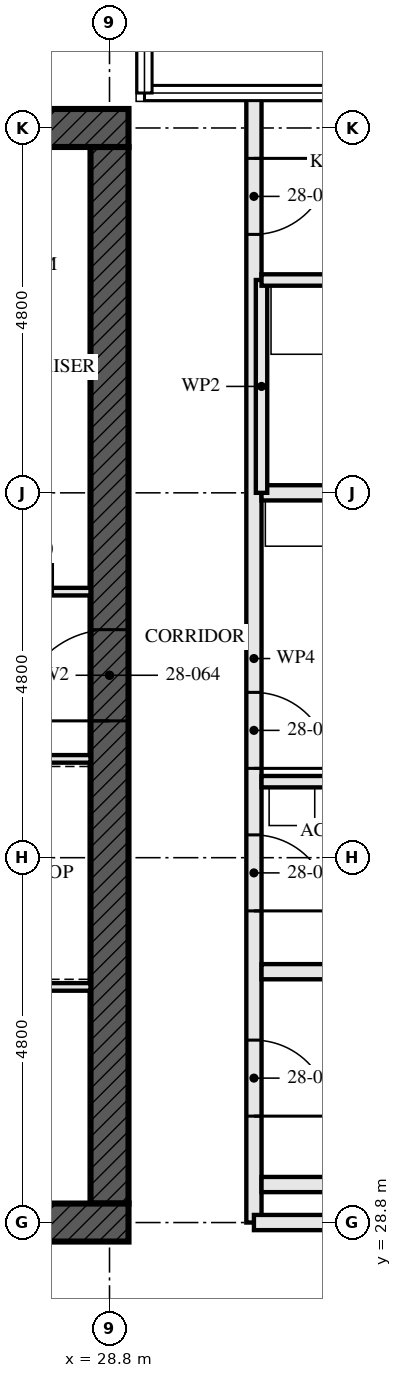
"""IFC4 building model, lengths in metres.
Left out: names, types, materials, properties, quantities, classifications, styles, units other than length and angle.
Written with IfcOpenShell. Run it as: python <this file> out.ifc"""

import sys

from ifc_helpers import new_model, si_unit, direction, frame, frame_2d, origin, place, context, subcontext, project, spatial, rectangle, extrude, element, fill, save


model = new_model("IFC4")
c1 = context("Model", 3, precision=1e-05, world=origin(), true_north=direction((0.0, 1.0)))
c2 = subcontext(c1, "Body", "Model", "MODEL_VIEW")
j1 = project(units=[si_unit("LENGTHUNIT", "METRE"), si_unit("PLANEANGLEUNIT", "RADIAN")], contexts=[c1])
p1 = place(None, origin())
s1 = spatial("IfcSite", under=j1, at=p1, CompositionType="ELEMENT")
p2 = place(p1, origin())
s2 = spatial("IfcBuilding", under=s1, at=p2, CompositionType="ELEMENT")
p3 = place(p2, frame((0.0, 0.0, 105.0)))
s3 = spatial("IfcBuildingStorey", under=s2, at=p3, CompositionType="ELEMENT", Elevation=105.0)
p4 = place(p3, frame((14.15, 28.8, -0.17), z_axis=(0.0, 0.0, 1.0), x_axis=(1.0, 0.0, 0.0)))
e1 = element("IfcWall", 1, at=p4, inside=s3, PredefinedType="SHEAR", context=c2, shape_type="SweptSolid", body=[
    extrude(rectangle(XDim=14.9, YDim=0.5, at=frame_2d((7.45, 0.0))), origin(), (0.0, 0.0, 1.0), 3.5),
])
p5 = place(p4, frame((6.85, 0.0, 0.17)))
e2 = element("IfcOpeningElement", 2, at=p5, cuts=e1, PredefinedType="OPENING", context=c2, shape_type="SweptSolid", body=[
    extrude(rectangle(XDim=1.2, YDim=2.1, at=frame_2d((0.6, 1.05))), frame((0.0, 0.26, 0.0), z_axis=(0.0, -1.0, 0.0), x_axis=(1.0, 0.0, 0.0)), (0.0, 0.0, 1.0), 0.521),
])
p6 = place(p3, frame((29.05, 43.2, -0.17), z_axis=(0.0, 0.0, 1.0), x_axis=(-1.0, 0.0, 0.0)))
e3 = element("IfcWall", 3, at=p6, inside=s3, PredefinedType="SHEAR", context=c2, shape_type="SweptSolid", body=[
    extrude(rectangle(XDim=14.9, YDim=0.5, at=frame_2d((7.45, 0.0))), origin(), (0.0, 0.0, 1.0), 3.5),
])
p7 = place(p6, frame((6.85, 0.0, 0.17)))
e4 = element("IfcOpeningElement", 4, at=p7, cuts=e3, PredefinedType="OPENING", context=c2, shape_type="SweptSolid", body=[
    extrude(rectangle(XDim=1.2, YDim=2.1, at=frame_2d((0.6, 1.05))), frame((0.0, 0.26, 0.0), z_axis=(0.0, -1.0, 0.0), x_axis=(1.0, 0.0, 0.0)), (0.0, 0.0, 1.0), 0.521),
])
p8 = place(p3, frame((28.8, 29.05, -0.17), z_axis=(0.0, 0.0, 1.0), x_axis=(0.0, 1.0, 0.0)))
e5 = element("IfcWall", 5, at=p8, inside=s3, PredefinedType="SHEAR", context=c2, shape_type="SweptSolid", body=[
    extrude(rectangle(XDim=13.9, YDim=0.5, at=frame_2d((6.95, 0.0))), origin(), (0.0, 0.0, 1.0), 3.5),
])
p9 = place(p8, frame((6.35, 0.0, 0.17)))
e6 = element("IfcOpeningElement", 6, at=p9, cuts=e5, PredefinedType="OPENING", context=c2, shape_type="SweptSolid", body=[
    extrude(rectangle(XDim=1.2, YDim=2.1, at=frame_2d((0.6, 1.05))), frame((0.0, 0.26, 0.0), z_axis=(0.0, -1.0, 0.0), x_axis=(1.0, 0.0, 0.0)), (0.0, 0.0, 1.0), 0.521),
])
for number, where, z_axis, x_axis in (
    (7, (35.5, 29.3, 0.0), (0.0, 0.0, 1.0), (-1.0, 0.0, 0.0)),
    (8, (35.5, 32.1, 0.0), (0.0, 0.0, 1.0), (-1.0, 0.0, 0.0)),
):
    element("IfcWall", number, at=place(p3, frame(where, z_axis=z_axis, x_axis=x_axis)), inside=s3, PredefinedType="SOLIDWALL", context=c2, shape_type="SweptSolid", body=[
        extrude(rectangle(XDim=4.7, YDim=0.2, at=frame_2d((2.35, 0.0))), origin(), (0.0, 0.0, 1.0), 2.99),
    ])
p10 = place(p3, frame((33.8, 34.6, 0.0), z_axis=(0.0, 0.0, 1.0), x_axis=(-1.0, 0.0, 0.0)))
e9 = element("IfcWall", 9, at=p10, inside=s3, PredefinedType="PARTITIONING", context=c2, shape_type="SweptSolid", body=[
    extrude(rectangle(XDim=3.0, YDim=0.15, at=frame_2d((1.5, 0.0))), origin(), (0.0, 0.0, 1.0), 3.33),
])
p11 = place(p3, frame((38.055, 38.4, 0.0), z_axis=(0.0, 0.0, 1.0), x_axis=(-1.0, 0.0, 0.0)))
e10 = element("IfcWall", 10, at=p11, inside=s3, PredefinedType="PARTITIONING", context=c2, shape_type="SweptSolid", body=[
    extrude(rectangle(XDim=7.255, YDim=0.2, at=frame_2d((3.627, 0.0))), origin(), (0.0, 0.0, 1.0), 2.55),
])
p12 = place(p3, frame((33.8, 41.2, 0.0), z_axis=(0.0, 0.0, 1.0), x_axis=(-1.0, 0.0, 0.0)))
e11 = element("IfcWall", 11, at=p12, inside=s3, PredefinedType="PARTITIONING", context=c2, shape_type="SweptSolid", body=[
    extrude(rectangle(XDim=3.0, YDim=0.15, at=frame_2d((1.5, 0.0))), origin(), (0.0, 0.0, 1.0), 3.33),
])
p13 = place(p3, frame((30.8, 38.4, 0.0), z_axis=(0.0, 0.0, 1.0), x_axis=(0.0, 1.0, 0.0)))
e12 = element("IfcWall", 12, at=p13, inside=s3, PredefinedType="PARTITIONING", context=c2, shape_type="SweptSolid", body=[
    extrude(rectangle(XDim=2.8, YDim=0.15, at=frame_2d((1.4, 0.0))), origin(), (0.0, 0.0, 1.0), 3.33),
])
p14 = place(p3, frame((30.7, 28.8, 0.0), z_axis=(0.0, 0.0, 1.0), x_axis=(0.0, 1.0, 0.0)))
e13 = element("IfcWall", 13, at=p14, inside=s3, PredefinedType="PARTITIONING", context=c2, shape_type="SweptSolid", body=[
    extrude(rectangle(XDim=14.84, YDim=0.2, at=frame_2d((7.42, 0.0))), origin(), (0.0, 0.0, 1.0), 2.32),
])
p15 = place(p14, frame((1.4, 0.0, 0.0)))
e14 = element("IfcOpeningElement", 14, at=p15, cuts=e13, PredefinedType="OPENING", context=c2, shape_type="SweptSolid", body=[
    extrude(rectangle(XDim=1.0, YDim=2.1, at=frame_2d((0.5, 1.05))), frame((0.0, 0.111, 0.0), z_axis=(0.0, -1.0, 0.0), x_axis=(1.0, 0.0, 0.0)), (0.0, 0.0, 1.0), 0.221),
])
p16 = place(p14, frame((4.1, 0.0, 0.0)))
e15 = element("IfcOpeningElement", 15, at=p16, cuts=e13, PredefinedType="OPENING", context=c2, shape_type="SweptSolid", body=[
    extrude(rectangle(XDim=1.0, YDim=2.1, at=frame_2d((0.5, 1.05))), frame((0.0, 0.111, 0.0), z_axis=(0.0, -1.0, 0.0), x_axis=(1.0, 0.0, 0.0)), (0.0, 0.0, 1.0), 0.221),
])
p17 = place(p14, frame((5.975, 0.0, 0.0)))
e16 = element("IfcOpeningElement", 16, at=p17, cuts=e13, PredefinedType="OPENING", context=c2, shape_type="SweptSolid", body=[
    extrude(rectangle(XDim=1.0, YDim=2.1, at=frame_2d((0.5, 1.05))), frame((0.0, 0.111, 0.0), z_axis=(0.0, -1.0, 0.0), x_axis=(1.0, 0.0, 0.0)), (0.0, 0.0, 1.0), 0.221),
])
p18 = place(p14, frame((13.0, 0.0, 0.0)))
e17 = element("IfcOpeningElement", 17, at=p18, cuts=e13, PredefinedType="OPENING", context=c2, shape_type="SweptSolid", body=[
    extrude(rectangle(XDim=1.0, YDim=2.1, at=frame_2d((0.5, 1.05))), frame((0.0, 0.111, 0.0), z_axis=(0.0, -1.0, 0.0), x_axis=(1.0, 0.0, 0.0)), (0.0, 0.0, 1.0), 0.221),
])
p19 = place(p3, frame((23.05, 34.9, 0.0), z_axis=(0.0, 0.0, 1.0), x_axis=(1.0, 0.0, 0.0)))
e18 = element("IfcWall", 18, at=p19, inside=s3, PredefinedType="SOLIDWALL", context=c2, shape_type="SweptSolid", body=[
    extrude(rectangle(XDim=5.5, YDim=0.1, at=frame_2d((2.75, 0.0))), origin(), (0.0, 0.0, 1.0), 3.33),
])
p20 = place(p3, frame((22.65, 37.1, 0.0), z_axis=(0.0, 0.0, 1.0), x_axis=(1.0, 0.0, 0.0)))
e19 = element("IfcWall", 19, at=p20, inside=s3, PredefinedType="SOLIDWALL", context=c2, shape_type="SweptSolid", body=[
    extrude(rectangle(XDim=5.9, YDim=0.1, at=frame_2d((2.95, 0.0))), origin(), (0.0, 0.0, 1.0), 3.33),
])
p21 = place(p20, frame((3.15, 0.0, 0.0)))
e20 = element("IfcOpeningElement", 20, at=p21, cuts=e19, PredefinedType="OPENING", context=c2, shape_type="SweptSolid", body=[
    extrude(rectangle(XDim=0.9, YDim=2.1, at=frame_2d((0.45, 1.05))), frame((0.0, 0.061, 0.0), z_axis=(0.0, -1.0, 0.0), x_axis=(1.0, 0.0, 0.0)), (0.0, 0.0, 1.0), 0.121),
])
p22 = place(p20, frame((4.7, 0.0, 0.0)))
e21 = element("IfcOpeningElement", 21, at=p22, cuts=e19, PredefinedType="OPENING", context=c2, shape_type="SweptSolid", body=[
    extrude(rectangle(XDim=0.7, YDim=2.1, at=frame_2d((0.35, 1.05))), frame((0.0, 0.061, 0.0), z_axis=(0.0, -1.0, 0.0), x_axis=(1.0, 0.0, 0.0)), (0.0, 0.0, 1.0), 0.121),
])
p23 = place(p3, frame((23.15, 31.9, 0.0), z_axis=(0.0, 0.0, 1.0), x_axis=(1.0, 0.0, 0.0)))
e22 = element("IfcWall", 22, at=p23, inside=s3, PredefinedType="SOLIDWALL", context=c2, shape_type="SweptSolid", body=[
    extrude(rectangle(XDim=5.4, YDim=0.1, at=frame_2d((2.7, 0.0))), origin(), (0.0, 0.0, 1.0), 3.33),
])
p24 = place(p3, frame((33.255, 28.8, 0.0), z_axis=(0.0, 0.0, 1.0), x_axis=(-1.0, 0.0, 0.0)))
e23 = element("IfcWall", 23, at=p24, inside=s3, PredefinedType="PARTITIONING", context=c2, shape_type="SweptSolid", body=[
    extrude(rectangle(XDim=2.555, YDim=0.2, at=frame_2d((1.277, 0.0))), origin(), (0.0, 0.0, 1.0), 2.32),
])
p25 = place(p15, frame((1.0, 0.0, 0.0), z_axis=(0.0, 0.0, 1.0), x_axis=(-1.0, 0.0, 0.0)))
e24 = element("IfcDoor", 24, at=p25, inside=s3, OperationType="SINGLE_SWING_LEFT", PredefinedType="DOOR", context=c2, shape_type="SweptSolid", body=[
    extrude(rectangle(XDim=1.0, YDim=2.1, at=frame_2d((0.5, 1.05))), frame((0.0, 0.032, 0.0), z_axis=(0.0, -1.0, 0.0), x_axis=(1.0, 0.0, 0.0)), (0.0, 0.0, 1.0), 0.064),
])
fill(e14, e24)
p26 = place(p16, frame((1.0, 0.0, 0.0), z_axis=(0.0, 0.0, 1.0), x_axis=(-1.0, 0.0, 0.0)))
e25 = element("IfcDoor", 25, at=p26, inside=s3, OperationType="SINGLE_SWING_LEFT", PredefinedType="DOOR", context=c2, shape_type="SweptSolid", body=[
    extrude(rectangle(XDim=1.0, YDim=2.1, at=frame_2d((0.5, 1.05))), frame((0.0, 0.027, 0.0), z_axis=(0.0, -1.0, 0.0), x_axis=(1.0, 0.0, 0.0)), (0.0, 0.0, 1.0), 0.054),
])
fill(e15, e25)
p27 = place(p17, frame((1.0, 0.0, 0.0), z_axis=(0.0, 0.0, 1.0), x_axis=(-1.0, 0.0, 0.0)))
e26 = element("IfcDoor", 26, at=p27, inside=s3, OperationType="SINGLE_SWING_LEFT", PredefinedType="DOOR", context=c2, shape_type="SweptSolid", body=[
    extrude(rectangle(XDim=1.0, YDim=2.1, at=frame_2d((0.5, 1.05))), frame((0.0, 0.027, 0.0), z_axis=(0.0, -1.0, 0.0), x_axis=(1.0, 0.0, 0.0)), (0.0, 0.0, 1.0), 0.054),
])
fill(e16, e26)
p28 = place(p18, frame((1.0, 0.0, 0.0), z_axis=(0.0, 0.0, 1.0), x_axis=(-1.0, 0.0, 0.0)))
e27 = element("IfcDoor", 27, at=p28, inside=s3, OperationType="SINGLE_SWING_RIGHT", PredefinedType="DOOR", context=c2, shape_type="SweptSolid", body=[
    extrude(rectangle(XDim=1.0, YDim=2.1, at=frame_2d((0.5, 1.05))), frame((0.0, 0.027, 0.0), z_axis=(0.0, -1.0, 0.0), x_axis=(1.0, 0.0, 0.0)), (0.0, 0.0, 1.0), 0.054),
])
fill(e17, e27)
p29 = place(p9, origin())
e28 = element("IfcDoor", 28, at=p29, inside=s3, OperationType="SINGLE_SWING_LEFT", PredefinedType="DOOR", context=c2, shape_type="SweptSolid", body=[
    extrude(rectangle(XDim=1.2, YDim=2.1, at=frame_2d((0.6, 1.05))), frame((0.0, 0.027, 0.0), z_axis=(0.0, -1.0, 0.0), x_axis=(1.0, 0.0, 0.0)), (0.0, 0.0, 1.0), 0.054),
])
fill(e6, e28)
save(model, sys.argv[1])
